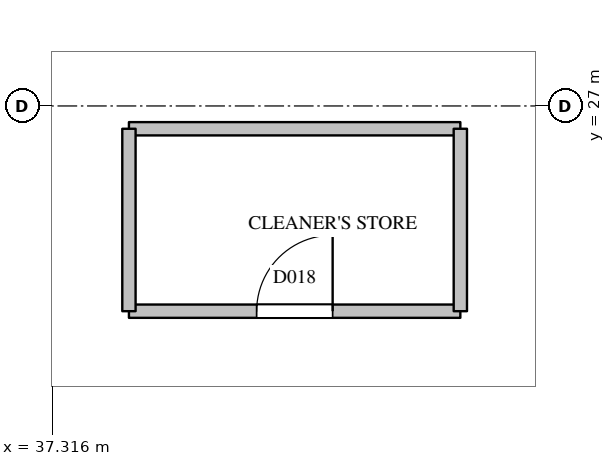
"""IFC4 building model, lengths in metres.
Left out: names, types, materials, properties, quantities, classifications, styles, units other than length and angle.
Written with IfcOpenShell. Run it as: python <this file> out.ifc"""

import sys

from ifc_helpers import new_model, si_unit, direction, frame, frame_2d, origin, place, context, subcontext, project, spatial, rectangle, extrude, element, fill, save


model = new_model("IFC4")
c1 = context("Model", 3, precision=1e-05, world=origin(), true_north=direction((0.0, 1.0)))
c2 = subcontext(c1, "Body", "Model", "MODEL_VIEW")
j1 = project(units=[si_unit("LENGTHUNIT", "METRE"), si_unit("PLANEANGLEUNIT", "RADIAN")], contexts=[c1])
p1 = place(None, origin())
s1 = spatial("IfcSite", under=j1, at=p1, CompositionType="ELEMENT")
p2 = place(p1, origin())
s2 = spatial("IfcBuilding", under=s1, at=p2, CompositionType="ELEMENT")
p3 = place(p2, frame((0.0, 0.0, 100.6)))
s3 = spatial("IfcBuildingStorey", under=s2, at=p3, CompositionType="ELEMENT", Elevation=100.6)
p4 = place(p3, frame((38.32, 24.3, 0.0), z_axis=(0.0, 0.0, 1.0), x_axis=(1.0, 0.0, 0.0)))
e1 = element("IfcWall", 1, at=p4, inside=s3, PredefinedType="PARTITIONING", context=c2, shape_type="SweptSolid", body=[
    extrude(rectangle(XDim=4.36, YDim=0.175, at=frame_2d((2.18, 0.0))), origin(), (0.0, 0.0, 1.0), 3.5),
])
p5 = place(p4, frame((1.68, 0.0, 0.0)))
e2 = element("IfcOpeningElement", 2, at=p5, cuts=e1, PredefinedType="OPENING", context=c2, shape_type="SweptSolid", body=[
    extrude(rectangle(XDim=1.0, YDim=2.1, at=frame_2d((0.5, 1.05))), frame((0.0, 0.097, 0.0), z_axis=(0.0, -1.0, 0.0), x_axis=(1.0, 0.0, 0.0)), (0.0, 0.0, 1.0), 0.195),
])
p6 = place(p3, frame((38.32, 26.7, 0.0), z_axis=(0.0, 0.0, 1.0), x_axis=(1.0, 0.0, 0.0)))
e3 = element("IfcWall", 3, at=p6, inside=s3, PredefinedType="PARTITIONING", context=c2, shape_type="SweptSolid", body=[
    extrude(rectangle(XDim=4.36, YDim=0.175, at=frame_2d((2.18, 0.0))), origin(), (0.0, 0.0, 1.0), 2.5),
])
for number, where, z_axis, x_axis in (
    (4, (38.32, 24.3, 0.0), (0.0, 0.0, 1.0), (0.0, 1.0, 0.0)),
    (5, (42.68, 24.3, 0.0), (0.0, 0.0, 1.0), (0.0, 1.0, 0.0)),
):
    element("IfcWall", number, at=place(p3, frame(where, z_axis=z_axis, x_axis=x_axis)), inside=s3, PredefinedType="PARTITIONING", context=c2, shape_type="SweptSolid", body=[
        extrude(rectangle(XDim=2.4, YDim=0.175, at=frame_2d((1.2, 0.0))), origin(), (0.0, 0.0, 1.0), 2.5),
    ])
p7 = place(p5, origin())
e6 = element("IfcDoor", 6, at=p7, inside=s3, OperationType="SINGLE_SWING_RIGHT", PredefinedType="DOOR", context=c2, shape_type="SweptSolid", body=[
    extrude(rectangle(XDim=1.0, YDim=2.1, at=frame_2d((0.5, 1.05))), frame((0.0, 0.025, 0.0), z_axis=(0.0, -1.0, 0.0), x_axis=(1.0, 0.0, 0.0)), (0.0, 0.0, 1.0), 0.05),
])
fill(e2, e6)
save(model, sys.argv[1])
